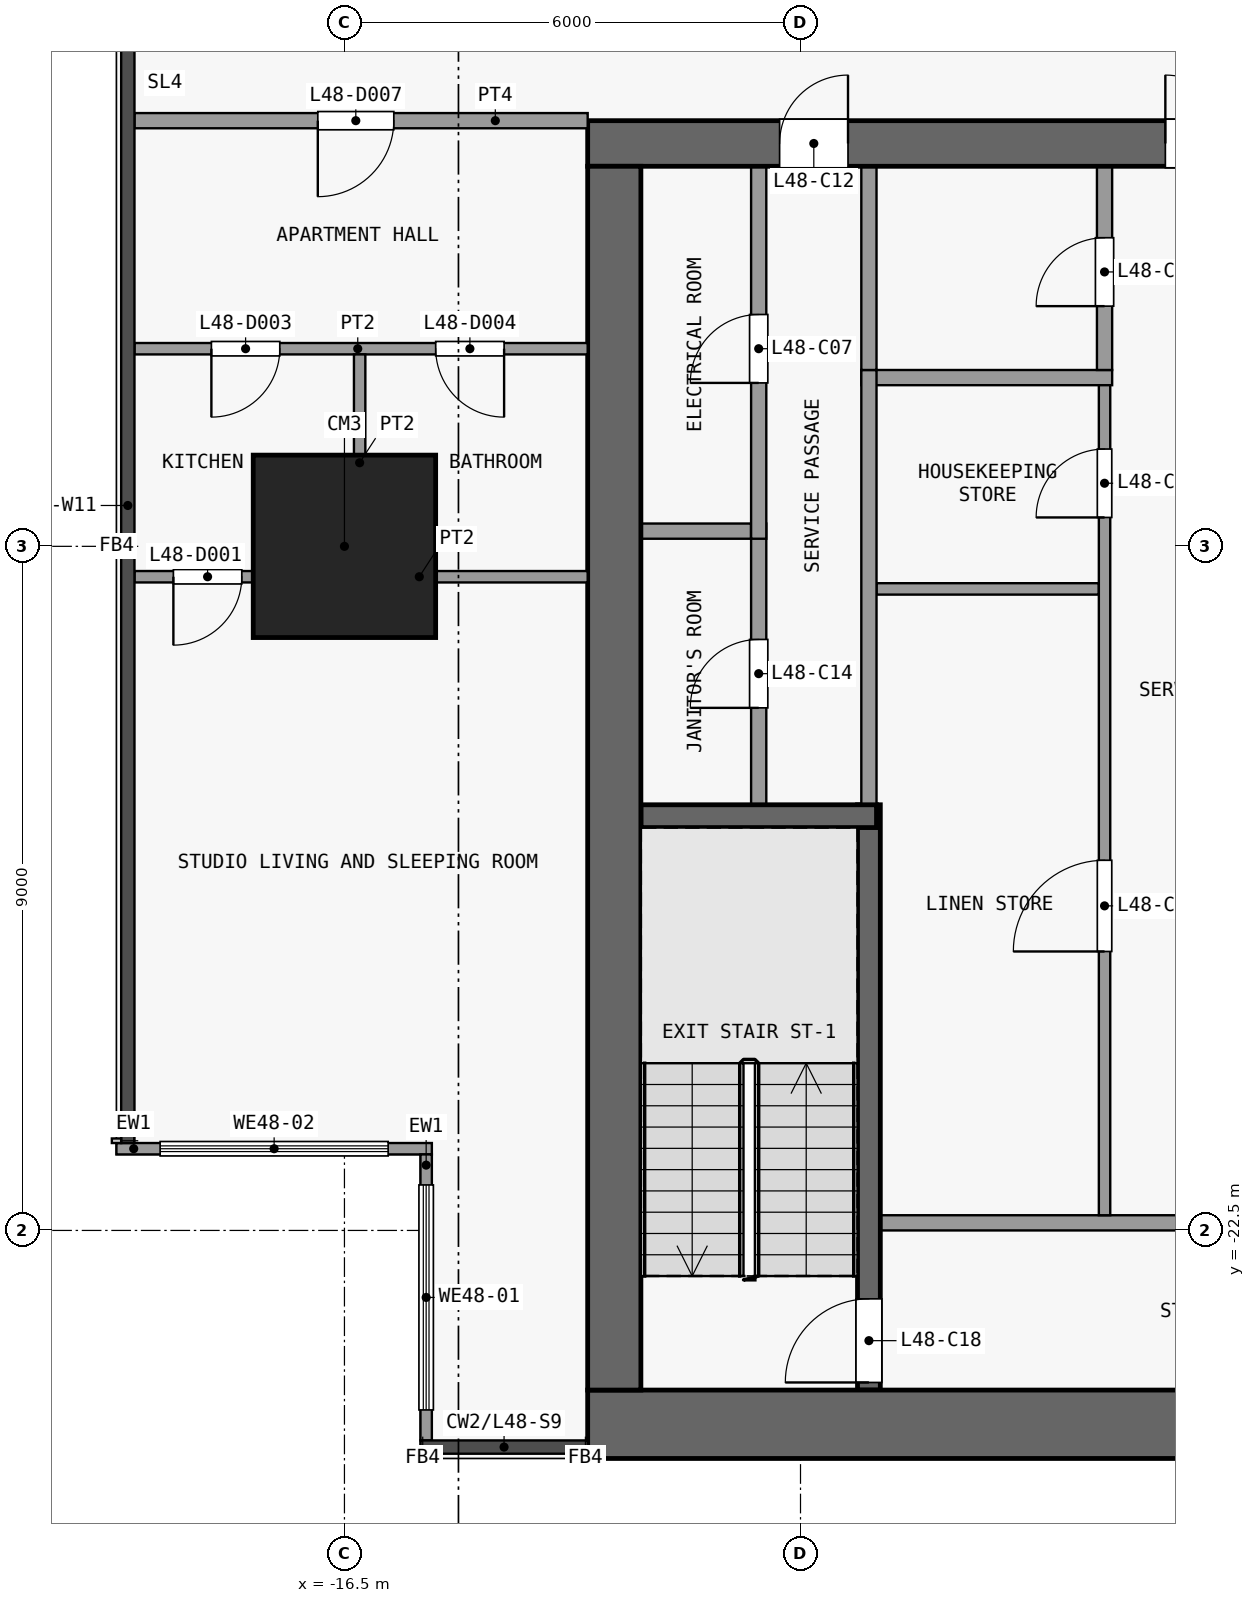
"""IFC4 building model, lengths in metres.
Left out: names, types, materials, properties, quantities, classifications, styles, units other than length and angle.
Written with IfcOpenShell. Run it as: python <this file> out.ifc"""

import sys

from ifc_helpers import new_model, si_unit, direction, frame, frame_2d, origin, origin_2d, place, context, subcontext, project, spatial, rectangle, extrude, element, fill, save


model = new_model("IFC4")
c1 = context("Model", 3, precision=1e-05, world=origin(), true_north=direction((0.0, 1.0)))
c2 = subcontext(c1, "Body", "Model", "MODEL_VIEW")
j1 = project(units=[si_unit("LENGTHUNIT", "METRE"), si_unit("PLANEANGLEUNIT", "RADIAN")], contexts=[c1])
p1 = place(None, origin())
s1 = spatial("IfcSite", under=j1, at=p1, CompositionType="ELEMENT")
p2 = place(p1, origin())
s2 = spatial("IfcBuilding", under=s1, at=p2, CompositionType="ELEMENT")
p3 = place(p2, frame((0.0, 0.0, 192.5)))
s3 = spatial("IfcBuildingStorey", under=s2, at=p3, CompositionType="ELEMENT", Elevation=192.5)
p4 = place(p3, frame((-16.5, -13.5, 0.0), z_axis=(0.0, 0.0, 1.0), x_axis=(1.0, 0.0, 0.0)))
e1 = element("IfcColumn", 1, at=p4, inside=s3, PredefinedType="COLUMN", context=c2, shape_type="SweptSolid", body=[
    extrude(rectangle(XDim=2.4, YDim=2.4, at=origin_2d()), origin(), (0.0, 0.0, 1.0), 3.6),
])
p5 = place(p3, frame((-13.3, -25.05, 0.0), z_axis=(0.0, 0.0, 1.0), x_axis=(1.0, 0.0, 0.0)))
e2 = element("IfcWall", 2, at=p5, inside=s3, PredefinedType="SHEAR", context=c2, shape_type="SweptSolid", body=[
    extrude(rectangle(XDim=26.6, YDim=0.9, at=frame_2d((13.3, 0.0))), origin(), (0.0, 0.0, 1.0), 3.3),
])
p6 = place(p3, frame((-13.3, -8.2, 0.0), z_axis=(0.0, 0.0, 1.0), x_axis=(1.0, 0.0, 0.0)))
e3 = element("IfcWall", 3, at=p6, inside=s3, PredefinedType="SHEAR", context=c2, shape_type="SweptSolid", body=[
    extrude(rectangle(XDim=26.6, YDim=0.6, at=frame_2d((13.3, 0.0))), origin(), (0.0, 0.0, 1.0), 3.3),
])
p7 = place(p6, frame((7.6, 0.0, 0.0)))
e4 = element("IfcOpeningElement", 4, at=p7, cuts=e3, PredefinedType="OPENING", context=c2, shape_type="SweptSolid", body=[
    extrude(rectangle(XDim=1.8, YDim=2.1, at=frame_2d((0.9, 1.05))), frame((0.0, 0.31, 0.0), z_axis=(0.0, -1.0, 0.0), x_axis=(1.0, 0.0, 0.0)), (0.0, 0.0, 1.0), 0.62),
])
p8 = place(p6, frame((17.2, 0.0, 0.0)))
e5 = element("IfcOpeningElement", 5, at=p8, cuts=e3, PredefinedType="OPENING", context=c2, shape_type="SweptSolid", body=[
    extrude(rectangle(XDim=1.8, YDim=2.1, at=frame_2d((0.9, 1.05))), frame((0.0, 0.31, 0.0), z_axis=(0.0, -1.0, 0.0), x_axis=(1.0, 0.0, 0.0)), (0.0, 0.0, 1.0), 0.62),
])
p9 = place(p6, frame((2.525, 0.0, 0.0)))
e6 = element("IfcOpeningElement", 6, at=p9, cuts=e3, PredefinedType="OPENING", context=c2, shape_type="SweptSolid", body=[
    extrude(rectangle(XDim=0.9, YDim=2.1, at=frame_2d((0.45, 1.05))), frame((0.0, 0.31, 0.0), z_axis=(0.0, -1.0, 0.0), x_axis=(1.0, 0.0, 0.0)), (0.0, 0.0, 1.0), 0.62),
])
p10 = place(p6, frame((23.175, 0.0, 0.0)))
e7 = element("IfcOpeningElement", 7, at=p10, cuts=e3, PredefinedType="OPENING", context=c2, shape_type="SweptSolid", body=[
    extrude(rectangle(XDim=0.9, YDim=2.1, at=frame_2d((0.45, 1.05))), frame((0.0, 0.31, 0.0), z_axis=(0.0, -1.0, 0.0), x_axis=(1.0, 0.0, 0.0)), (0.0, 0.0, 1.0), 0.62),
])
p11 = place(p3, frame((-12.95, -24.6, 0.0), z_axis=(0.0, 0.0, 1.0), x_axis=(0.0, 1.0, 0.0)))
e8 = element("IfcWall", 8, at=p11, inside=s3, PredefinedType="SHEAR", context=c2, shape_type="SweptSolid", body=[
    extrude(rectangle(XDim=16.1, YDim=0.7, at=frame_2d((8.05, 0.0))), origin(), (0.0, 0.0, 1.0), 3.3),
])
p12 = place(p3, frame((-3.25, -22.4, 0.0), z_axis=(0.0, 0.0, 1.0), x_axis=(-1.0, 0.0, 0.0)))
e9 = element("IfcWall", 9, at=p12, inside=s3, PredefinedType="PARTITIONING", context=c2, shape_type="SweptSolid", body=[
    extrude(rectangle(XDim=6.2, YDim=0.2, at=frame_2d((3.1, 0.0))), origin(), (0.0, 0.0, 1.0), 3.3),
])
p13 = place(p12, frame((0.8, 0.0, 0.0)))
e10 = element("IfcOpeningElement", 10, at=p13, cuts=e9, PredefinedType="OPENING", context=c2, shape_type="SweptSolid", body=[
    extrude(rectangle(XDim=1.5, YDim=2.1, at=frame_2d((0.75, 1.05))), frame((0.0, 0.11, 0.0), z_axis=(0.0, -1.0, 0.0), x_axis=(1.0, 0.0, 0.0)), (0.0, 0.0, 1.0), 0.22),
])
p14 = place(p3, frame((-12.6, -17.05, 0.0), z_axis=(0.0, 0.0, 1.0), x_axis=(1.0, 0.0, 0.0)))
e11 = element("IfcWall", 11, at=p14, inside=s3, PredefinedType="SHEAR", context=c2, shape_type="SweptSolid", body=[
    extrude(rectangle(XDim=3.1, YDim=0.3, at=frame_2d((1.55, 0.0))), origin(), (0.0, 0.0, 1.0), 3.3),
])
p15 = place(p3, frame((-9.5, -14.06, 0.0), z_axis=(0.0, 0.0, 1.0), x_axis=(1.0, 0.0, 0.0)))
e12 = element("IfcWall", 12, at=p15, inside=s3, PredefinedType="PARTITIONING", context=c2, shape_type="SweptSolid", body=[
    extrude(rectangle(XDim=2.925, YDim=0.15, at=frame_2d((1.462, 0.0))), origin(), (0.0, 0.0, 1.0), 3.3),
])
p16 = place(p3, frame((-12.6, -13.3, 0.0), z_axis=(0.0, 0.0, 1.0), x_axis=(1.0, 0.0, 0.0)))
e13 = element("IfcWall", 13, at=p16, inside=s3, PredefinedType="PARTITIONING", context=c2, shape_type="SweptSolid", body=[
    extrude(rectangle(XDim=1.45, YDim=0.2, at=frame_2d((0.725, 0.0))), origin(), (0.0, 0.0, 1.0), 3.3),
])
p17 = place(p3, frame((-9.7, -11.28, 0.0), z_axis=(0.0, 0.0, 1.0), x_axis=(1.0, 0.0, 0.0)))
e14 = element("IfcWall", 14, at=p17, inside=s3, PredefinedType="PARTITIONING", context=c2, shape_type="SweptSolid", body=[
    extrude(rectangle(XDim=3.3, YDim=0.2, at=frame_2d((1.65, 0.0))), origin(), (0.0, 0.0, 1.0), 3.3),
])
p18 = place(p3, frame((-11.05, -16.9, 0.0), z_axis=(0.0, 0.0, 1.0), x_axis=(0.0, 1.0, 0.0)))
e15 = element("IfcWall", 15, at=p18, inside=s3, PredefinedType="PARTITIONING", context=c2, shape_type="SweptSolid", body=[
    extrude(rectangle(XDim=3.7, YDim=0.2, at=frame_2d((1.85, 0.0))), origin(), (0.0, 0.0, 1.0), 3.3),
])
p19 = place(p18, frame((1.275, 0.0, 0.0)))
e16 = element("IfcOpeningElement", 16, at=p19, cuts=e15, PredefinedType="OPENING", context=c2, shape_type="SweptSolid", body=[
    extrude(rectangle(XDim=0.9, YDim=2.1, at=frame_2d((0.45, 1.05))), frame((0.0, 0.11, 0.0), z_axis=(0.0, -1.0, 0.0), x_axis=(1.0, 0.0, 0.0)), (0.0, 0.0, 1.0), 0.22),
])
p20 = place(p3, frame((-11.05, -13.4, 0.0), z_axis=(0.0, 0.0, 1.0), x_axis=(0.0, 1.0, 0.0)))
e17 = element("IfcWall", 17, at=p20, inside=s3, PredefinedType="PARTITIONING", context=c2, shape_type="SweptSolid", body=[
    extrude(rectangle(XDim=4.9, YDim=0.2, at=frame_2d((2.45, 0.0))), origin(), (0.0, 0.0, 1.0), 3.3),
])
p21 = place(p20, frame((2.05, 0.0, 0.0)))
e18 = element("IfcOpeningElement", 18, at=p21, cuts=e17, PredefinedType="OPENING", context=c2, shape_type="SweptSolid", body=[
    extrude(rectangle(XDim=0.9, YDim=2.1, at=frame_2d((0.45, 1.05))), frame((0.0, 0.11, 0.0), z_axis=(0.0, -1.0, 0.0), x_axis=(1.0, 0.0, 0.0)), (0.0, 0.0, 1.0), 0.22),
])
p22 = place(p3, frame((-9.6, -24.6, 0.0), z_axis=(0.0, 0.0, 1.0), x_axis=(0.0, 1.0, 0.0)))
e19 = element("IfcWall", 19, at=p22, inside=s3, PredefinedType="SHEAR", context=c2, shape_type="SweptSolid", body=[
    extrude(rectangle(XDim=7.7, YDim=0.3, at=frame_2d((3.85, 0.0))), origin(), (0.0, 0.0, 1.0), 3.3),
])
p23 = place(p22, frame((0.1, 0.0, 0.0)))
e20 = element("IfcOpeningElement", 20, at=p23, cuts=e19, PredefinedType="OPENING", context=c2, shape_type="SweptSolid", body=[
    extrude(rectangle(XDim=1.1, YDim=2.1, at=frame_2d((0.55, 1.05))), frame((0.0, 0.16, 0.0), z_axis=(0.0, -1.0, 0.0), x_axis=(1.0, 0.0, 0.0)), (0.0, 0.0, 1.0), 0.32),
])
p24 = place(p3, frame((-9.6, -16.9, 0.0), z_axis=(0.0, 0.0, 1.0), x_axis=(0.0, 1.0, 0.0)))
e21 = element("IfcWall", 21, at=p24, inside=s3, PredefinedType="PARTITIONING", context=c2, shape_type="SweptSolid", body=[
    extrude(rectangle(XDim=5.72, YDim=0.2, at=frame_2d((2.86, 0.0))), origin(), (0.0, 0.0, 1.0), 3.3),
])
p25 = place(p3, frame((-9.6, -11.18, 0.0), z_axis=(0.0, 0.0, 1.0), x_axis=(0.0, 1.0, 0.0)))
e22 = element("IfcWall", 22, at=p25, inside=s3, PredefinedType="PARTITIONING", context=c2, shape_type="SweptSolid", body=[
    extrude(rectangle(XDim=2.68, YDim=0.2, at=frame_2d((1.34, 0.0))), origin(), (0.0, 0.0, 1.0), 3.3),
])
p26 = place(p3, frame((-6.5, -22.3, 0.0), z_axis=(0.0, 0.0, 1.0), x_axis=(0.0, 1.0, 0.0)))
e23 = element("IfcWall", 23, at=p26, inside=s3, PredefinedType="PARTITIONING", context=c2, shape_type="SweptSolid", body=[
    extrude(rectangle(XDim=10.92, YDim=0.15, at=frame_2d((5.46, 0.0))), origin(), (0.0, 0.0, 1.0), 3.3),
])
p27 = place(p26, frame((3.47, 0.0, 0.0)))
e24 = element("IfcOpeningElement", 24, at=p27, cuts=e23, PredefinedType="OPENING", context=c2, shape_type="SweptSolid", body=[
    extrude(rectangle(XDim=1.2, YDim=2.1, at=frame_2d((0.6, 1.05))), frame((0.0, 0.085, 0.0), z_axis=(0.0, -1.0, 0.0), x_axis=(1.0, 0.0, 0.0)), (0.0, 0.0, 1.0), 0.17),
])
p28 = place(p26, frame((9.18, 0.0, 0.0)))
e25 = element("IfcOpeningElement", 25, at=p28, cuts=e23, PredefinedType="OPENING", context=c2, shape_type="SweptSolid", body=[
    extrude(rectangle(XDim=0.9, YDim=2.1, at=frame_2d((0.45, 1.05))), frame((0.0, 0.085, 0.0), z_axis=(0.0, -1.0, 0.0), x_axis=(1.0, 0.0, 0.0)), (0.0, 0.0, 1.0), 0.17),
])
p29 = place(p3, frame((-6.5, -11.18, 0.0), z_axis=(0.0, 0.0, 1.0), x_axis=(0.0, 1.0, 0.0)))
e26 = element("IfcWall", 26, at=p29, inside=s3, PredefinedType="PARTITIONING", context=c2, shape_type="SweptSolid", body=[
    extrude(rectangle(XDim=2.68, YDim=0.2, at=frame_2d((1.34, 0.0))), origin(), (0.0, 0.0, 1.0), 3.3),
])
p30 = place(p29, frame((0.84, 0.0, 0.0)))
e27 = element("IfcOpeningElement", 27, at=p30, cuts=e26, PredefinedType="OPENING", context=c2, shape_type="SweptSolid", body=[
    extrude(rectangle(XDim=0.9, YDim=2.1, at=frame_2d((0.45, 1.05))), frame((0.0, 0.11, 0.0), z_axis=(0.0, -1.0, 0.0), x_axis=(1.0, 0.0, 0.0)), (0.0, 0.0, 1.0), 0.22),
])
p31 = place(p3, frame((-15.425, -25.262, 0.0), z_axis=(0.0, 0.0, 1.0), x_axis=(0.0, 1.0, 0.0)))
e28 = element("IfcWall", 28, at=p31, inside=s3, PredefinedType="SOLIDWALL", context=c2, shape_type="SweptSolid", body=[
    extrude(rectangle(XDim=3.762, YDim=0.15, at=frame_2d((1.881, 0.0))), origin(), (0.0, 0.0, 1.0), 3.3),
])
p32 = place(p31, frame((0.401, 0.0, 0.9)))
e29 = element("IfcOpeningElement", 29, at=p32, cuts=e28, PredefinedType="OPENING", context=c2, shape_type="SweptSolid", body=[
    extrude(rectangle(XDim=2.96, YDim=2.4, at=frame_2d((1.48, 1.2))), frame((0.0, 0.085, 0.0), z_axis=(0.0, -1.0, 0.0), x_axis=(1.0, 0.0, 0.0)), (0.0, 0.0, 1.0), 0.17),
])
p33 = place(p3, frame((-15.35, -21.425, 0.0), z_axis=(0.0, 0.0, 1.0), x_axis=(-1.0, 0.0, 0.0)))
e30 = element("IfcWall", 30, at=p33, inside=s3, PredefinedType="SOLIDWALL", context=c2, shape_type="SweptSolid", body=[
    extrude(rectangle(XDim=4.15, YDim=0.15, at=frame_2d((2.075, 0.0))), origin(), (0.0, 0.0, 1.0), 3.3),
])
p34 = place(p33, frame((0.575, 0.0, 0.9)))
e31 = element("IfcOpeningElement", 31, at=p34, cuts=e30, PredefinedType="OPENING", context=c2, shape_type="SweptSolid", body=[
    extrude(rectangle(XDim=3.0, YDim=2.4, at=frame_2d((1.5, 1.2))), frame((0.0, 0.085, 0.0), z_axis=(0.0, -1.0, 0.0), x_axis=(1.0, 0.0, 0.0)), (0.0, 0.0, 1.0), 0.17),
])
p35 = place(p3, frame((-19.262, -13.9, 0.0), z_axis=(0.0, 0.0, 1.0), x_axis=(1.0, 0.0, 0.0)))
e32 = element("IfcWall", 32, at=p35, inside=s3, PredefinedType="PARTITIONING", context=c2, shape_type="SweptSolid", body=[
    extrude(rectangle(XDim=5.962, YDim=0.15, at=frame_2d((2.981, 0.0))), origin(), (0.0, 0.0, 1.0), 3.3),
])
p36 = place(p35, frame((0.512, 0.0, 0.0)))
e33 = element("IfcOpeningElement", 33, at=p36, cuts=e32, PredefinedType="OPENING", context=c2, shape_type="SweptSolid", body=[
    extrude(rectangle(XDim=0.9, YDim=2.1, at=frame_2d((0.45, 1.05))), frame((0.0, 0.085, 0.0), z_axis=(0.0, -1.0, 0.0), x_axis=(1.0, 0.0, 0.0)), (0.0, 0.0, 1.0), 0.17),
])
p37 = place(p3, frame((-19.262, -10.9, 0.0), z_axis=(0.0, 0.0, 1.0), x_axis=(1.0, 0.0, 0.0)))
e34 = element("IfcWall", 34, at=p37, inside=s3, PredefinedType="PARTITIONING", context=c2, shape_type="SweptSolid", body=[
    extrude(rectangle(XDim=5.962, YDim=0.15, at=frame_2d((2.981, 0.0))), origin(), (0.0, 0.0, 1.0), 3.3),
])
p38 = place(p37, frame((1.012, 0.0, 0.0)))
e35 = element("IfcOpeningElement", 35, at=p38, cuts=e34, PredefinedType="OPENING", context=c2, shape_type="SweptSolid", body=[
    extrude(rectangle(XDim=0.9, YDim=2.1, at=frame_2d((0.45, 1.05))), frame((0.0, 0.085, 0.0), z_axis=(0.0, -1.0, 0.0), x_axis=(1.0, 0.0, 0.0)), (0.0, 0.0, 1.0), 0.17),
])
p39 = place(p37, frame((3.963, 0.0, 0.0)))
e36 = element("IfcOpeningElement", 36, at=p39, cuts=e34, PredefinedType="OPENING", context=c2, shape_type="SweptSolid", body=[
    extrude(rectangle(XDim=0.9, YDim=2.1, at=frame_2d((0.45, 1.05))), frame((0.0, 0.085, 0.0), z_axis=(0.0, -1.0, 0.0), x_axis=(1.0, 0.0, 0.0)), (0.0, 0.0, 1.0), 0.17),
])
p40 = place(p3, frame((-19.262, -7.9, 0.0), z_axis=(0.0, 0.0, 1.0), x_axis=(1.0, 0.0, 0.0)))
e37 = element("IfcWall", 37, at=p40, inside=s3, PredefinedType="PARTITIONING", context=c2, shape_type="SweptSolid", body=[
    extrude(rectangle(XDim=5.962, YDim=0.2, at=frame_2d((2.981, 0.0))), origin(), (0.0, 0.0, 1.0), 3.3),
])
p41 = place(p40, frame((2.412, 0.0, 0.0)))
e38 = element("IfcOpeningElement", 38, at=p41, cuts=e37, PredefinedType="OPENING", context=c2, shape_type="SweptSolid", body=[
    extrude(rectangle(XDim=1.0, YDim=2.1, at=frame_2d((0.5, 1.05))), frame((0.0, 0.11, 0.0), z_axis=(0.0, -1.0, 0.0), x_axis=(1.0, 0.0, 0.0)), (0.0, 0.0, 1.0), 0.22),
])
p42 = place(p3, frame((-16.3, -13.825, 0.0), z_axis=(0.0, 0.0, 1.0), x_axis=(0.0, 1.0, 0.0)))
e39 = element("IfcWall", 39, at=p42, inside=s3, PredefinedType="PARTITIONING", context=c2, shape_type="SweptSolid", body=[
    extrude(rectangle(XDim=2.85, YDim=0.15, at=frame_2d((1.425, 0.0))), origin(), (0.0, 0.0, 1.0), 3.3),
])
p43 = place(p7, origin())
e40 = element("IfcDoor", 40, at=p43, inside=s3, OperationType="DOUBLE_DOOR_SINGLE_SWING", PredefinedType="DOOR", context=c2, shape_type="SweptSolid", body=[
    extrude(rectangle(XDim=1.8, YDim=2.1, at=frame_2d((0.9, 1.05))), frame((0.0, 0.025, 0.0), z_axis=(0.0, -1.0, 0.0), x_axis=(1.0, 0.0, 0.0)), (0.0, 0.0, 1.0), 0.05),
])
fill(e4, e40)
p44 = place(p21, origin())
e41 = element("IfcDoor", 41, at=p44, inside=s3, OperationType="SINGLE_SWING_LEFT", PredefinedType="DOOR", context=c2, shape_type="SweptSolid", body=[
    extrude(rectangle(XDim=0.9, YDim=2.1, at=frame_2d((0.45, 1.05))), frame((0.0, 0.025, 0.0), z_axis=(0.0, -1.0, 0.0), x_axis=(1.0, 0.0, 0.0)), (0.0, 0.0, 1.0), 0.05),
])
fill(e18, e41)
p45 = place(p30, origin())
e42 = element("IfcDoor", 42, at=p45, inside=s3, OperationType="SINGLE_SWING_LEFT", PredefinedType="DOOR", context=c2, shape_type="SweptSolid", body=[
    extrude(rectangle(XDim=0.9, YDim=2.1, at=frame_2d((0.45, 1.05))), frame((0.0, 0.025, 0.0), z_axis=(0.0, -1.0, 0.0), x_axis=(1.0, 0.0, 0.0)), (0.0, 0.0, 1.0), 0.05),
])
fill(e27, e42)
p46 = place(p9, origin())
e43 = element("IfcDoor", 43, at=p46, inside=s3, OperationType="SINGLE_SWING_RIGHT", PredefinedType="DOOR", context=c2, shape_type="SweptSolid", body=[
    extrude(rectangle(XDim=0.9, YDim=2.1, at=frame_2d((0.45, 1.05))), frame((0.0, 0.025, 0.0), z_axis=(0.0, -1.0, 0.0), x_axis=(1.0, 0.0, 0.0)), (0.0, 0.0, 1.0), 0.05),
])
fill(e6, e43)
p47 = place(p19, origin())
e44 = element("IfcDoor", 44, at=p47, inside=s3, OperationType="SINGLE_SWING_LEFT", PredefinedType="DOOR", context=c2, shape_type="SweptSolid", body=[
    extrude(rectangle(XDim=0.9, YDim=2.1, at=frame_2d((0.45, 1.05))), frame((0.0, 0.025, 0.0), z_axis=(0.0, -1.0, 0.0), x_axis=(1.0, 0.0, 0.0)), (0.0, 0.0, 1.0), 0.05),
])
fill(e16, e44)
p48 = place(p27, origin())
e45 = element("IfcDoor", 45, at=p48, inside=s3, OperationType="SINGLE_SWING_LEFT", PredefinedType="DOOR", context=c2, shape_type="SweptSolid", body=[
    extrude(rectangle(XDim=1.2, YDim=2.1, at=frame_2d((0.6, 1.05))), frame((0.0, 0.025, 0.0), z_axis=(0.0, -1.0, 0.0), x_axis=(1.0, 0.0, 0.0)), (0.0, 0.0, 1.0), 0.05),
])
fill(e24, e45)
p49 = place(p28, origin())
e46 = element("IfcDoor", 46, at=p49, inside=s3, OperationType="SINGLE_SWING_LEFT", PredefinedType="DOOR", context=c2, shape_type="SweptSolid", body=[
    extrude(rectangle(XDim=0.9, YDim=2.1, at=frame_2d((0.45, 1.05))), frame((0.0, 0.025, 0.0), z_axis=(0.0, -1.0, 0.0), x_axis=(1.0, 0.0, 0.0)), (0.0, 0.0, 1.0), 0.05),
])
fill(e25, e46)
p50 = place(p23, origin())
e47 = element("IfcDoor", 47, at=p50, inside=s3, OperationType="SINGLE_SWING_LEFT", PredefinedType="DOOR", context=c2, shape_type="SweptSolid", body=[
    extrude(rectangle(XDim=1.1, YDim=2.1, at=frame_2d((0.55, 1.05))), frame((0.0, 0.025, 0.0), z_axis=(0.0, -1.0, 0.0), x_axis=(1.0, 0.0, 0.0)), (0.0, 0.0, 1.0), 0.05),
])
fill(e20, e47)
p51 = place(p32, origin())
e48 = element("IfcWindow", 48, at=p51, inside=s3, PartitioningType="SINGLE_PANEL", PredefinedType="WINDOW", context=c2, shape_type="SweptSolid", body=[
    extrude(rectangle(XDim=2.96, YDim=2.4, at=frame_2d((1.48, 1.2))), frame((0.0, 0.03, 0.0), z_axis=(0.0, -1.0, 0.0), x_axis=(1.0, 0.0, 0.0)), (0.0, 0.0, 1.0), 0.06),
])
fill(e29, e48)
p52 = place(p34, origin())
e49 = element("IfcWindow", 49, at=p52, inside=s3, PartitioningType="SINGLE_PANEL", PredefinedType="WINDOW", context=c2, shape_type="SweptSolid", body=[
    extrude(rectangle(XDim=3.0, YDim=2.4, at=frame_2d((1.5, 1.2))), frame((0.0, 0.03, 0.0), z_axis=(0.0, -1.0, 0.0), x_axis=(1.0, 0.0, 0.0)), (0.0, 0.0, 1.0), 0.06),
])
fill(e31, e49)
p53 = place(p36, origin())
e50 = element("IfcDoor", 50, at=p53, inside=s3, OperationType="SINGLE_SWING_LEFT", PredefinedType="DOOR", context=c2, shape_type="SweptSolid", body=[
    extrude(rectangle(XDim=0.9, YDim=2.1, at=frame_2d((0.45, 1.05))), frame((0.0, 0.025, 0.0), z_axis=(0.0, -1.0, 0.0), x_axis=(1.0, 0.0, 0.0)), (0.0, 0.0, 1.0), 0.05),
])
fill(e33, e50)
p54 = place(p38, origin())
e51 = element("IfcDoor", 51, at=p54, inside=s3, OperationType="SINGLE_SWING_LEFT", PredefinedType="DOOR", context=c2, shape_type="SweptSolid", body=[
    extrude(rectangle(XDim=0.9, YDim=2.1, at=frame_2d((0.45, 1.05))), frame((0.0, 0.025, 0.0), z_axis=(0.0, -1.0, 0.0), x_axis=(1.0, 0.0, 0.0)), (0.0, 0.0, 1.0), 0.05),
])
fill(e35, e51)
p55 = place(p39, origin())
e52 = element("IfcDoor", 52, at=p55, inside=s3, OperationType="SINGLE_SWING_RIGHT", PredefinedType="DOOR", context=c2, shape_type="SweptSolid", body=[
    extrude(rectangle(XDim=0.9, YDim=2.1, at=frame_2d((0.45, 1.05))), frame((0.0, 0.025, 0.0), z_axis=(0.0, -1.0, 0.0), x_axis=(1.0, 0.0, 0.0)), (0.0, 0.0, 1.0), 0.05),
])
fill(e36, e52)
p56 = place(p41, origin())
e53 = element("IfcDoor", 53, at=p56, inside=s3, OperationType="SINGLE_SWING_LEFT", PredefinedType="DOOR", context=c2, shape_type="SweptSolid", body=[
    extrude(rectangle(XDim=1.0, YDim=2.1, at=frame_2d((0.5, 1.05))), frame((0.0, 0.025, 0.0), z_axis=(0.0, -1.0, 0.0), x_axis=(1.0, 0.0, 0.0)), (0.0, 0.0, 1.0), 0.05),
])
fill(e38, e53)
save(model, sys.argv[1])
